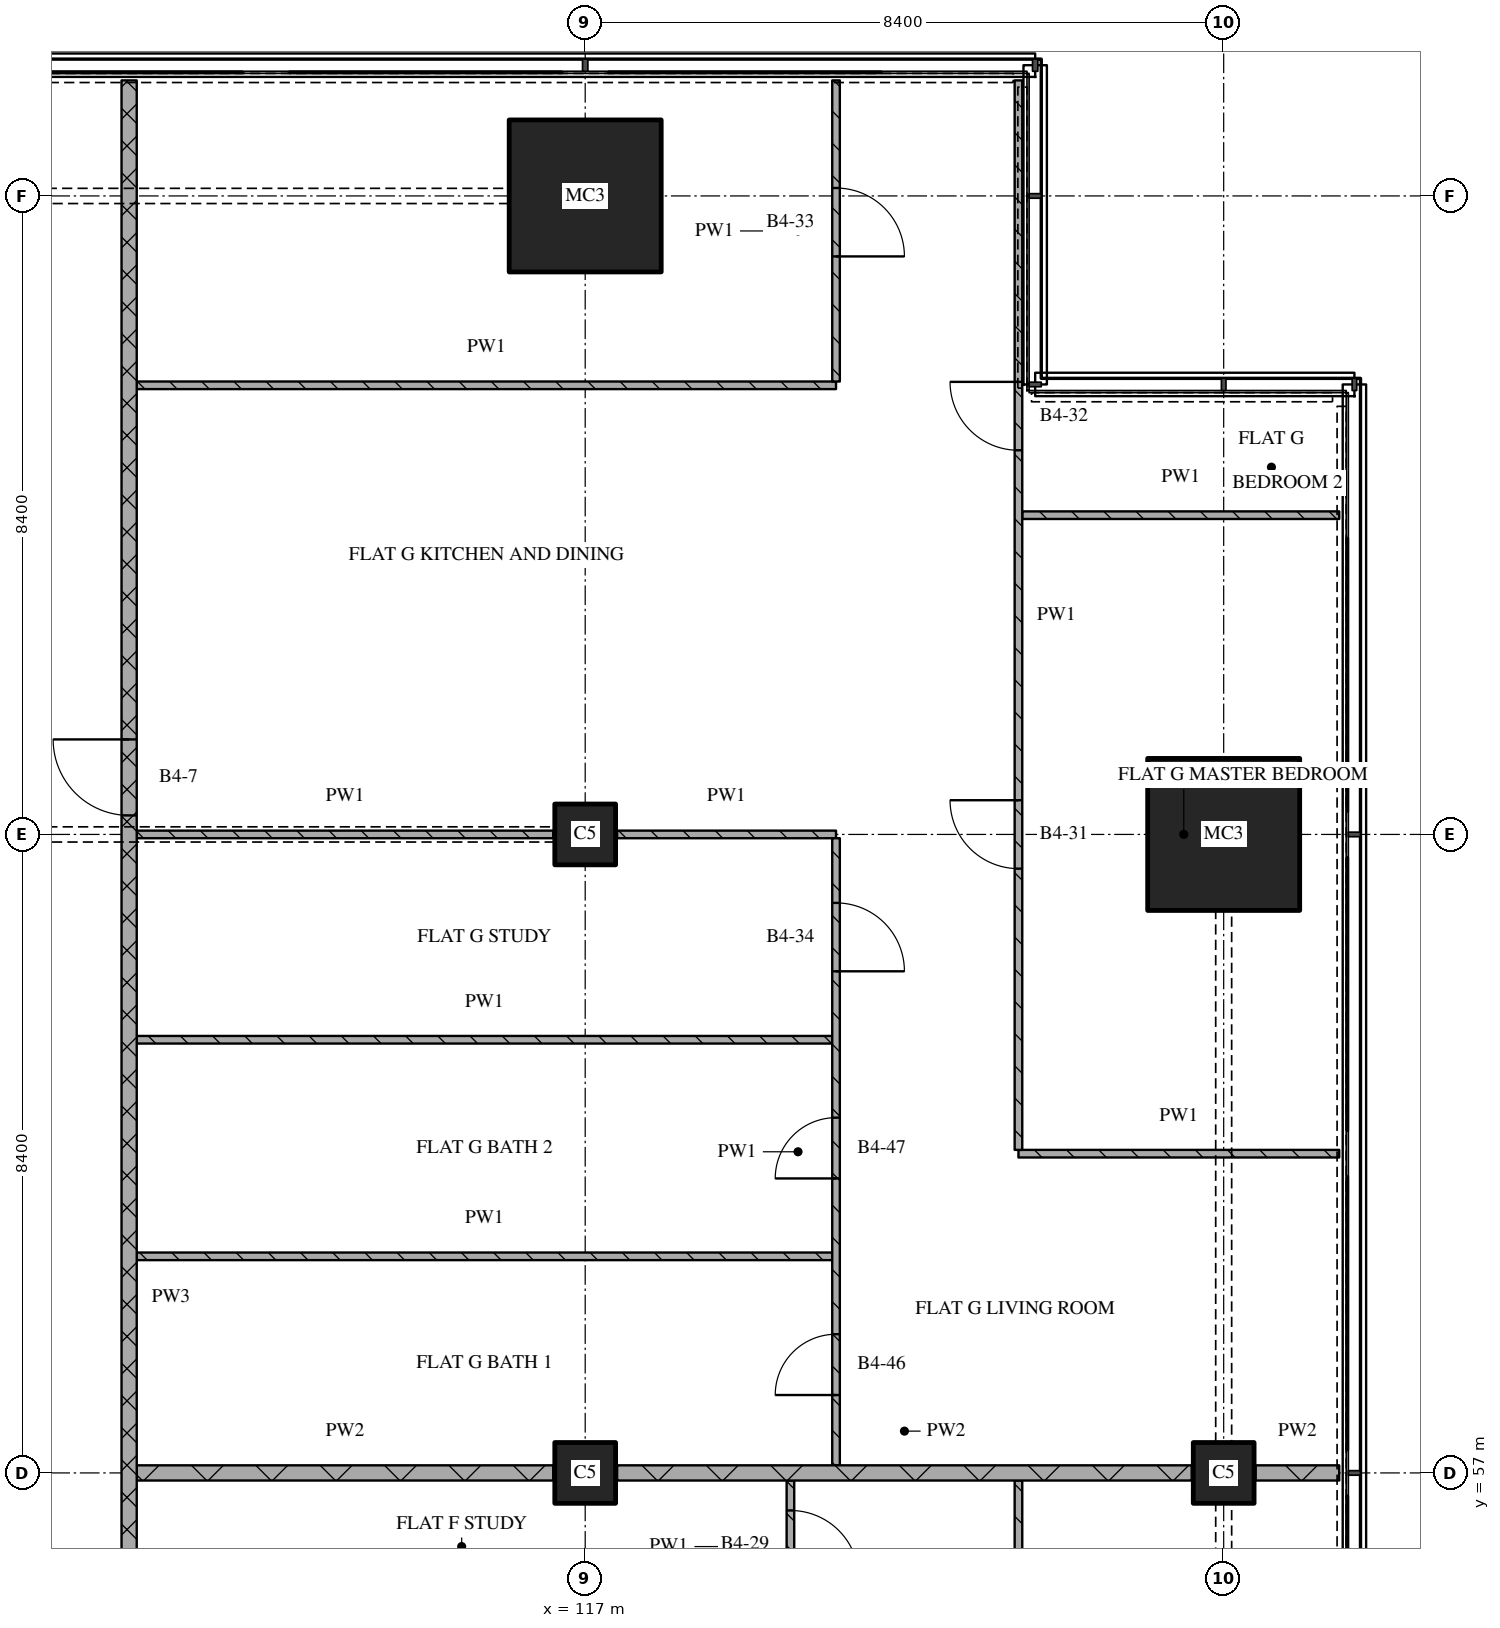
"""IFC4 building model, lengths in metres.
Left out: names, types, materials, properties, quantities, classifications, styles, units other than length and angle.
Written with IfcOpenShell. Run it as: python <this file> out.ifc"""

import sys

from ifc_helpers import new_model, si_unit, direction, frame, frame_2d, origin, origin_2d, place, context, subcontext, project, spatial, rectangle, extrude, element, fill, save


model = new_model("IFC4")
c1 = context("Model", 3, precision=1e-05, world=origin(), true_north=direction((0.0, 1.0)))
c2 = subcontext(c1, "Body", "Model", "MODEL_VIEW")
j1 = project(units=[si_unit("LENGTHUNIT", "METRE"), si_unit("PLANEANGLEUNIT", "RADIAN")], contexts=[c1])
p1 = place(None, origin())
s1 = spatial("IfcSite", under=j1, at=p1, CompositionType="ELEMENT")
p2 = place(p1, origin())
s2 = spatial("IfcBuilding", under=s1, at=p2, CompositionType="ELEMENT")
p3 = place(p2, frame((0.0, 0.0, 131.25)))
s3 = spatial("IfcBuildingStorey", under=s2, at=p3, CompositionType="ELEMENT", Elevation=131.25)
for number, where, z_axis, x_axis in (
    (1, (117.0, 57.0, 0.0), (0.0, 0.0, 1.0), (1.0, 0.0, 0.0)),
    (2, (117.0, 65.4, 0.0), (0.0, 0.0, 1.0), (1.0, 0.0, 0.0)),
):
    element("IfcColumn", number, at=place(p3, frame(where, z_axis=z_axis, x_axis=x_axis)), inside=s3, PredefinedType="COLUMN", context=c2, shape_type="SweptSolid", body=[
        extrude(rectangle(XDim=0.8, YDim=0.8, at=origin_2d()), origin(), (0.0, 0.0, 1.0), 3.6),
    ])
p4 = place(p3, frame((117.0, 73.8, 0.0), z_axis=(0.0, 0.0, 1.0), x_axis=(1.0, 0.0, 0.0)))
e3 = element("IfcColumn", 3, at=p4, inside=s3, PredefinedType="COLUMN", context=c2, shape_type="SweptSolid", body=[
    extrude(rectangle(XDim=2.0, YDim=2.0, at=origin_2d()), origin(), (0.0, 0.0, 1.0), 3.6),
])
p5 = place(p3, frame((125.4, 57.0, 0.0), z_axis=(0.0, 0.0, 1.0), x_axis=(1.0, 0.0, 0.0)))
e4 = element("IfcColumn", 4, at=p5, inside=s3, PredefinedType="COLUMN", context=c2, shape_type="SweptSolid", body=[
    extrude(rectangle(XDim=0.8, YDim=0.8, at=origin_2d()), origin(), (0.0, 0.0, 1.0), 3.6),
])
p6 = place(p3, frame((125.4, 65.4, 0.0), z_axis=(0.0, 0.0, 1.0), x_axis=(1.0, 0.0, 0.0)))
e5 = element("IfcColumn", 5, at=p6, inside=s3, PredefinedType="COLUMN", context=c2, shape_type="SweptSolid", body=[
    extrude(rectangle(XDim=2.0, YDim=2.0, at=origin_2d()), origin(), (0.0, 0.0, 1.0), 3.6),
])
p7 = place(p3, frame((111.1, 57.0, 0.0), z_axis=(0.0, 0.0, 1.0), x_axis=(1.0, 0.0, 0.0)))
e6 = element("IfcWall", 6, at=p7, inside=s3, PredefinedType="PARTITIONING", context=c2, shape_type="SweptSolid", body=[
    extrude(rectangle(XDim=5.48, YDim=0.2, at=frame_2d((2.74, 0.0))), origin(), (0.0, 0.0, 1.0), 3.32),
])
p8 = place(p3, frame((117.42, 57.0, 0.0), z_axis=(0.0, 0.0, 1.0), x_axis=(1.0, 0.0, 0.0)))
e7 = element("IfcWall", 7, at=p8, inside=s3, PredefinedType="PARTITIONING", context=c2, shape_type="SweptSolid", body=[
    extrude(rectangle(XDim=7.56, YDim=0.2, at=frame_2d((3.78, 0.0))), origin(), (0.0, 0.0, 1.0), 3.32),
])
p9 = place(p3, frame((125.82, 57.0, 0.0), z_axis=(0.0, 0.0, 1.0), x_axis=(1.0, 0.0, 0.0)))
e8 = element("IfcWall", 8, at=p9, inside=s3, PredefinedType="PARTITIONING", context=c2, shape_type="SweptSolid", body=[
    extrude(rectangle(XDim=1.1, YDim=0.2, at=frame_2d((0.55, 0.0))), origin(), (0.0, 0.0, 1.0), 3.32),
])
p10 = place(p3, frame((111.1, 59.85, 0.0), z_axis=(0.0, 0.0, 1.0), x_axis=(1.0, 0.0, 0.0)))
e9 = element("IfcWall", 9, at=p10, inside=s3, PredefinedType="PARTITIONING", context=c2, shape_type="SweptSolid", body=[
    extrude(rectangle(XDim=9.15, YDim=0.1, at=frame_2d((4.575, 0.0))), origin(), (0.0, 0.0, 1.0), 3.32),
])
p11 = place(p3, frame((122.7, 61.2, 0.0), z_axis=(0.0, 0.0, 1.0), x_axis=(1.0, 0.0, 0.0)))
e10 = element("IfcWall", 10, at=p11, inside=s3, PredefinedType="PARTITIONING", context=c2, shape_type="SweptSolid", body=[
    extrude(rectangle(XDim=4.22, YDim=0.1, at=frame_2d((2.11, 0.0))), origin(), (0.0, 0.0, 1.0), 3.32),
])
p12 = place(p3, frame((111.1, 62.699, 0.0), z_axis=(0.0, 0.0, 1.0), x_axis=(1.0, 0.0, 0.0)))
e11 = element("IfcWall", 11, at=p12, inside=s3, PredefinedType="PARTITIONING", context=c2, shape_type="SweptSolid", body=[
    extrude(rectangle(XDim=9.15, YDim=0.1, at=frame_2d((4.575, 0.0))), origin(), (0.0, 0.0, 1.0), 3.32),
])
p13 = place(p3, frame((111.1, 65.4, 0.0), z_axis=(0.0, 0.0, 1.0), x_axis=(1.0, 0.0, 0.0)))
e12 = element("IfcWall", 12, at=p13, inside=s3, PredefinedType="PARTITIONING", context=c2, shape_type="SweptSolid", body=[
    extrude(rectangle(XDim=5.48, YDim=0.1, at=frame_2d((2.74, 0.0))), origin(), (0.0, 0.0, 1.0), 2.82),
])
p14 = place(p3, frame((117.42, 65.4, 0.0), z_axis=(0.0, 0.0, 1.0), x_axis=(1.0, 0.0, 0.0)))
e13 = element("IfcWall", 13, at=p14, inside=s3, PredefinedType="PARTITIONING", context=c2, shape_type="SweptSolid", body=[
    extrude(rectangle(XDim=2.88, YDim=0.1, at=frame_2d((1.44, 0.0))), origin(), (0.0, 0.0, 1.0), 3.32),
])
p15 = place(p3, frame((122.75, 69.6, 0.0), z_axis=(0.0, 0.0, 1.0), x_axis=(1.0, 0.0, 0.0)))
e14 = element("IfcWall", 14, at=p15, inside=s3, PredefinedType="PARTITIONING", context=c2, shape_type="SweptSolid", body=[
    extrude(rectangle(XDim=4.17, YDim=0.1, at=frame_2d((2.085, 0.0))), origin(), (0.0, 0.0, 1.0), 3.32),
])
p16 = place(p3, frame((111.1, 71.309, 0.0), z_axis=(0.0, 0.0, 1.0), x_axis=(1.0, 0.0, 0.0)))
e15 = element("IfcWall", 15, at=p16, inside=s3, PredefinedType="PARTITIONING", context=c2, shape_type="SweptSolid", body=[
    extrude(rectangle(XDim=9.2, YDim=0.1, at=frame_2d((4.6, 0.0))), origin(), (0.0, 0.0, 1.0), 3.32),
])
p17 = place(p3, frame((111.0, 75.32, 0.0), z_axis=(0.0, 0.0, 1.0), x_axis=(0.0, -1.0, 0.0)))
e16 = element("IfcWall", 16, at=p17, inside=s3, PredefinedType="PARTITIONING", context=c2, shape_type="SweptSolid", body=[
    extrude(rectangle(XDim=32.02, YDim=0.2, at=frame_2d((16.01, 0.0))), origin(), (0.0, 0.0, 1.0), 3.32),
])
p18 = place(p17, frame((8.67, 0.0, 0.0)))
e17 = element("IfcOpeningElement", 17, at=p18, cuts=e16, PredefinedType="OPENING", context=c2, shape_type="SweptSolid", body=[
    extrude(rectangle(XDim=1.0, YDim=2.1, at=frame_2d((0.5, 1.05))), frame((0.0, 0.11, 0.0), z_axis=(0.0, -1.0, 0.0), x_axis=(1.0, 0.0, 0.0)), (0.0, 0.0, 1.0), 0.22),
])
p19 = place(p17, frame((25.17, 0.0, 0.0)))
e18 = element("IfcOpeningElement", 18, at=p19, cuts=e16, PredefinedType="OPENING", context=c2, shape_type="SweptSolid", body=[
    extrude(rectangle(XDim=1.0, YDim=2.1, at=frame_2d((0.5, 1.05))), frame((0.0, 0.11, 0.0), z_axis=(0.0, -1.0, 0.0), x_axis=(1.0, 0.0, 0.0)), (0.0, 0.0, 1.0), 0.22),
])
p20 = place(p3, frame((119.7, 55.163, 0.0), z_axis=(0.0, 0.0, 1.0), x_axis=(0.0, 1.0, 0.0)))
e19 = element("IfcWall", 19, at=p20, inside=s3, PredefinedType="PARTITIONING", context=c2, shape_type="SweptSolid", body=[
    extrude(rectangle(XDim=1.737, YDim=0.1, at=frame_2d((0.869, 0.0))), origin(), (0.0, 0.0, 1.0), 3.32),
])
p21 = place(p20, frame((0.444, 0.0, 0.0)))
e20 = element("IfcOpeningElement", 20, at=p21, cuts=e19, PredefinedType="OPENING", context=c2, shape_type="SweptSolid", body=[
    extrude(rectangle(XDim=0.9, YDim=2.1, at=frame_2d((0.45, 1.05))), frame((0.0, 0.06, 0.0), z_axis=(0.0, -1.0, 0.0), x_axis=(1.0, 0.0, 0.0)), (0.0, 0.0, 1.0), 0.12),
])
p22 = place(p3, frame((120.3, 57.1, 0.0), z_axis=(0.0, 0.0, 1.0), x_axis=(0.0, 1.0, 0.0)))
e21 = element("IfcWall", 21, at=p22, inside=s3, PredefinedType="PARTITIONING", context=c2, shape_type="SweptSolid", body=[
    extrude(rectangle(XDim=8.25, YDim=0.1, at=frame_2d((4.125, 0.0))), origin(), (0.0, 0.0, 1.0), 3.32),
])
p23 = place(p22, frame((0.925, 0.0, 0.0)))
e22 = element("IfcOpeningElement", 22, at=p23, cuts=e21, PredefinedType="OPENING", context=c2, shape_type="SweptSolid", body=[
    extrude(rectangle(XDim=0.8, YDim=2.1, at=frame_2d((0.4, 1.05))), frame((0.0, 0.06, 0.0), z_axis=(0.0, -1.0, 0.0), x_axis=(1.0, 0.0, 0.0)), (0.0, 0.0, 1.0), 0.12),
])
p24 = place(p22, frame((3.774, 0.0, 0.0)))
e23 = element("IfcOpeningElement", 23, at=p24, cuts=e21, PredefinedType="OPENING", context=c2, shape_type="SweptSolid", body=[
    extrude(rectangle(XDim=0.8, YDim=2.1, at=frame_2d((0.4, 1.05))), frame((0.0, 0.06, 0.0), z_axis=(0.0, -1.0, 0.0), x_axis=(1.0, 0.0, 0.0)), (0.0, 0.0, 1.0), 0.12),
])
p25 = place(p22, frame((6.5, 0.0, 0.0)))
e24 = element("IfcOpeningElement", 24, at=p25, cuts=e21, PredefinedType="OPENING", context=c2, shape_type="SweptSolid", body=[
    extrude(rectangle(XDim=0.9, YDim=2.1, at=frame_2d((0.45, 1.05))), frame((0.0, 0.06, 0.0), z_axis=(0.0, -1.0, 0.0), x_axis=(1.0, 0.0, 0.0)), (0.0, 0.0, 1.0), 0.12),
])
p26 = place(p3, frame((120.3, 71.359, 0.0), z_axis=(0.0, 0.0, 1.0), x_axis=(0.0, 1.0, 0.0)))
e25 = element("IfcWall", 25, at=p26, inside=s3, PredefinedType="PARTITIONING", context=c2, shape_type="SweptSolid", body=[
    extrude(rectangle(XDim=3.961, YDim=0.1, at=frame_2d((1.981, 0.0))), origin(), (0.0, 0.0, 1.0), 3.32),
])
p27 = place(p26, frame((1.646, 0.0, 0.0)))
e26 = element("IfcOpeningElement", 26, at=p27, cuts=e25, PredefinedType="OPENING", context=c2, shape_type="SweptSolid", body=[
    extrude(rectangle(XDim=0.9, YDim=2.1, at=frame_2d((0.45, 1.05))), frame((0.0, 0.06, 0.0), z_axis=(0.0, -1.0, 0.0), x_axis=(1.0, 0.0, 0.0)), (0.0, 0.0, 1.0), 0.12),
])
p28 = place(p3, frame((122.7, 56.9, 0.0), z_axis=(0.0, 0.0, 1.0), x_axis=(0.0, -1.0, 0.0)))
e27 = element("IfcWall", 27, at=p28, inside=s3, PredefinedType="PARTITIONING", context=c2, shape_type="SweptSolid", body=[
    extrude(rectangle(XDim=8.25, YDim=0.1, at=frame_2d((4.125, 0.0))), origin(), (0.0, 0.0, 1.0), 3.32),
])
p29 = place(p28, frame((3.65, 0.0, 0.0)))
e28 = element("IfcOpeningElement", 28, at=p29, cuts=e27, PredefinedType="OPENING", context=c2, shape_type="SweptSolid", body=[
    extrude(rectangle(XDim=0.9, YDim=2.1, at=frame_2d((0.45, 1.05))), frame((0.0, 0.06, 0.0), z_axis=(0.0, -1.0, 0.0), x_axis=(1.0, 0.0, 0.0)), (0.0, 0.0, 1.0), 0.12),
])
p30 = place(p3, frame((122.7, 75.32, 0.0), z_axis=(0.0, 0.0, 1.0), x_axis=(0.0, -1.0, 0.0)))
e29 = element("IfcWall", 29, at=p30, inside=s3, PredefinedType="PARTITIONING", context=c2, shape_type="SweptSolid", body=[
    extrude(rectangle(XDim=14.07, YDim=0.1, at=frame_2d((7.035, 0.0))), origin(), (0.0, 0.0, 1.0), 3.32),
])
p31 = place(p30, frame((3.966, 0.0, 0.0)))
e30 = element("IfcOpeningElement", 30, at=p31, cuts=e29, PredefinedType="OPENING", context=c2, shape_type="SweptSolid", body=[
    extrude(rectangle(XDim=0.9, YDim=2.1, at=frame_2d((0.45, 1.05))), frame((0.0, 0.06, 0.0), z_axis=(0.0, -1.0, 0.0), x_axis=(1.0, 0.0, 0.0)), (0.0, 0.0, 1.0), 0.12),
])
p32 = place(p30, frame((9.47, 0.0, 0.0)))
e31 = element("IfcOpeningElement", 31, at=p32, cuts=e29, PredefinedType="OPENING", context=c2, shape_type="SweptSolid", body=[
    extrude(rectangle(XDim=0.9, YDim=2.1, at=frame_2d((0.45, 1.05))), frame((0.0, 0.06, 0.0), z_axis=(0.0, -1.0, 0.0), x_axis=(1.0, 0.0, 0.0)), (0.0, 0.0, 1.0), 0.12),
])
p33 = place(p18, origin())
e32 = element("IfcDoor", 32, at=p33, inside=s3, OperationType="SINGLE_SWING_RIGHT", PredefinedType="DOOR", context=c2, shape_type="SweptSolid", body=[
    extrude(rectangle(XDim=1.0, YDim=2.1, at=frame_2d((0.5, 1.05))), frame((0.0, 0.025, 0.0), z_axis=(0.0, -1.0, 0.0), x_axis=(1.0, 0.0, 0.0)), (0.0, 0.0, 1.0), 0.05),
])
fill(e17, e32)
p34 = place(p21, origin())
e33 = element("IfcDoor", 33, at=p34, inside=s3, OperationType="SINGLE_SWING_RIGHT", PredefinedType="DOOR", context=c2, shape_type="SweptSolid", body=[
    extrude(rectangle(XDim=0.9, YDim=2.1, at=frame_2d((0.45, 1.05))), frame((0.0, 0.025, 0.0), z_axis=(0.0, -1.0, 0.0), x_axis=(1.0, 0.0, 0.0)), (0.0, 0.0, 1.0), 0.05),
])
fill(e20, e33)
p35 = place(p23, origin())
e34 = element("IfcDoor", 34, at=p35, inside=s3, OperationType="SINGLE_SWING_LEFT", PredefinedType="DOOR", context=c2, shape_type="SweptSolid", body=[
    extrude(rectangle(XDim=0.8, YDim=2.1, at=frame_2d((0.4, 1.05))), frame((0.0, 0.025, 0.0), z_axis=(0.0, -1.0, 0.0), x_axis=(1.0, 0.0, 0.0)), (0.0, 0.0, 1.0), 0.05),
])
fill(e22, e34)
p36 = place(p24, origin())
e35 = element("IfcDoor", 35, at=p36, inside=s3, OperationType="SINGLE_SWING_LEFT", PredefinedType="DOOR", context=c2, shape_type="SweptSolid", body=[
    extrude(rectangle(XDim=0.8, YDim=2.1, at=frame_2d((0.4, 1.05))), frame((0.0, 0.025, 0.0), z_axis=(0.0, -1.0, 0.0), x_axis=(1.0, 0.0, 0.0)), (0.0, 0.0, 1.0), 0.05),
])
fill(e23, e35)
p37 = place(p25, origin())
e36 = element("IfcDoor", 36, at=p37, inside=s3, OperationType="SINGLE_SWING_RIGHT", PredefinedType="DOOR", context=c2, shape_type="SweptSolid", body=[
    extrude(rectangle(XDim=0.9, YDim=2.1, at=frame_2d((0.45, 1.05))), frame((0.0, 0.025, 0.0), z_axis=(0.0, -1.0, 0.0), x_axis=(1.0, 0.0, 0.0)), (0.0, 0.0, 1.0), 0.05),
])
fill(e24, e36)
p38 = place(p27, origin())
e37 = element("IfcDoor", 37, at=p38, inside=s3, OperationType="SINGLE_SWING_RIGHT", PredefinedType="DOOR", context=c2, shape_type="SweptSolid", body=[
    extrude(rectangle(XDim=0.9, YDim=2.1, at=frame_2d((0.45, 1.05))), frame((0.0, 0.025, 0.0), z_axis=(0.0, -1.0, 0.0), x_axis=(1.0, 0.0, 0.0)), (0.0, 0.0, 1.0), 0.05),
])
fill(e26, e37)
p39 = place(p31, origin())
e38 = element("IfcDoor", 38, at=p39, inside=s3, OperationType="SINGLE_SWING_RIGHT", PredefinedType="DOOR", context=c2, shape_type="SweptSolid", body=[
    extrude(rectangle(XDim=0.9, YDim=2.1, at=frame_2d((0.45, 1.05))), frame((0.0, 0.025, 0.0), z_axis=(0.0, -1.0, 0.0), x_axis=(1.0, 0.0, 0.0)), (0.0, 0.0, 1.0), 0.05),
])
fill(e30, e38)
p40 = place(p32, origin())
e39 = element("IfcDoor", 39, at=p40, inside=s3, OperationType="SINGLE_SWING_RIGHT", PredefinedType="DOOR", context=c2, shape_type="SweptSolid", body=[
    extrude(rectangle(XDim=0.9, YDim=2.1, at=frame_2d((0.45, 1.05))), frame((0.0, 0.025, 0.0), z_axis=(0.0, -1.0, 0.0), x_axis=(1.0, 0.0, 0.0)), (0.0, 0.0, 1.0), 0.05),
])
fill(e31, e39)
save(model, sys.argv[1])
